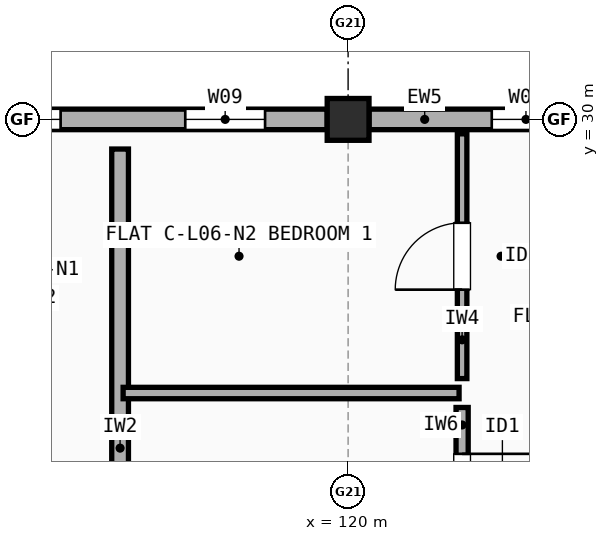
"""IFC4 building model, lengths in metres.
Left out: names, types, materials, properties, quantities, classifications, styles, units other than length and angle.
Written with IfcOpenShell. Run it as: python <this file> out.ifc"""

import sys

from ifc_helpers import new_model, si_unit, direction, frame, frame_2d, origin, origin_2d, place, context, subcontext, project, spatial, rectangle, extrude, element, fill, save


model = new_model("IFC4")
c1 = context("Model", 3, precision=1e-05, world=origin(), true_north=direction((0.0, 1.0)))
c2 = subcontext(c1, "Body", "Model", "MODEL_VIEW")
j1 = project(units=[si_unit("LENGTHUNIT", "METRE"), si_unit("PLANEANGLEUNIT", "RADIAN")], contexts=[c1])
p1 = place(None, origin())
s1 = spatial("IfcSite", under=j1, at=p1, CompositionType="ELEMENT")
p2 = place(p1, origin())
s2 = spatial("IfcBuilding", under=s1, at=p2, CompositionType="ELEMENT")
p3 = place(p2, frame((0.0, 0.0, 20.5)))
s3 = spatial("IfcBuildingStorey", under=s2, at=p3, CompositionType="ELEMENT", Elevation=20.5)
p4 = place(p3, frame((120.0, 30.0, 0.0), z_axis=(0.0, 0.0, 1.0), x_axis=(1.0, 0.0, 0.0)))
e1 = element("IfcColumn", 1, at=p4, inside=s3, PredefinedType="COLUMN", context=c2, shape_type="SweptSolid", body=[
    extrude(rectangle(XDim=0.55, YDim=0.55, at=origin_2d()), origin(), (0.0, 0.0, 1.0), 2.97),
])
p5 = place(p3, frame((125.725, 30.0, 0.0), z_axis=(0.0, 0.0, 1.0), x_axis=(-1.0, 0.0, 0.0)))
e2 = element("IfcWall", 2, at=p5, inside=s3, PredefinedType="STANDARD", context=c2, shape_type="SweptSolid", body=[
    extrude(rectangle(XDim=5.45, YDim=0.27, at=frame_2d((2.725, 0.0))), origin(), (0.0, 0.0, 1.0), 2.452),
])
p6 = place(p5, frame((0.35, 0.0, 0.9)))
e3 = element("IfcOpeningElement", 3, at=p6, cuts=e2, PredefinedType="OPENING", context=c2, shape_type="SweptSolid", body=[
    extrude(rectangle(XDim=0.9, YDim=1.3, at=frame_2d((0.45, 0.65))), frame((0.0, 0.145, 0.0), z_axis=(0.0, -1.0, 0.0), x_axis=(1.0, 0.0, 0.0)), (0.0, 0.0, 1.0), 0.29),
])
p7 = place(p5, frame((2.935, 0.0, 0.9)))
e4 = element("IfcOpeningElement", 4, at=p7, cuts=e2, PredefinedType="OPENING", context=c2, shape_type="SweptSolid", body=[
    extrude(rectangle(XDim=0.9, YDim=1.3, at=frame_2d((0.45, 0.65))), frame((0.0, 0.145, 0.0), z_axis=(0.0, -1.0, 0.0), x_axis=(1.0, 0.0, 0.0)), (0.0, 0.0, 1.0), 0.29),
])
p8 = place(p3, frame((119.725, 30.0, 0.0), z_axis=(0.0, 0.0, 1.0), x_axis=(-1.0, 0.0, 0.0)))
e5 = element("IfcWall", 5, at=p8, inside=s3, PredefinedType="STANDARD", context=c2, shape_type="SweptSolid", body=[
    extrude(rectangle(XDim=5.45, YDim=0.27, at=frame_2d((2.725, 0.0))), origin(), (0.0, 0.0, 1.0), 2.452),
])
p9 = place(p8, frame((0.817, 0.0, 0.9)))
e6 = element("IfcOpeningElement", 6, at=p9, cuts=e5, PredefinedType="OPENING", context=c2, shape_type="SweptSolid", body=[
    extrude(rectangle(XDim=1.05, YDim=1.35, at=frame_2d((0.525, 0.675))), frame((0.0, 0.145, 0.0), z_axis=(0.0, -1.0, 0.0), x_axis=(1.0, 0.0, 0.0)), (0.0, 0.0, 1.0), 0.29),
])
p10 = place(p8, frame((3.508, 0.0, 0.9)))
e7 = element("IfcOpeningElement", 7, at=p10, cuts=e5, PredefinedType="OPENING", context=c2, shape_type="SweptSolid", body=[
    extrude(rectangle(XDim=1.2, YDim=1.35, at=frame_2d((0.6, 0.675))), frame((0.0, 0.145, 0.0), z_axis=(0.0, -1.0, 0.0), x_axis=(1.0, 0.0, 0.0)), (0.0, 0.0, 1.0), 0.29),
])
p11 = place(p3, frame((117.0, 21.74, 0.0), z_axis=(0.0, 0.0, 1.0), x_axis=(0.0, 1.0, 0.0)))
e8 = element("IfcWall", 8, at=p11, inside=s3, PredefinedType="SOLIDWALL", context=c2, shape_type="SweptSolid", body=[
    extrude(rectangle(XDim=7.87, YDim=0.22, at=frame_2d((3.935, 0.0))), origin(), (0.0, 0.0, 1.0), 2.408),
])
p12 = place(p3, frame((121.5, 26.59, 0.0), z_axis=(0.0, 0.0, 1.0), x_axis=(0.0, 1.0, 0.0)))
e9 = element("IfcWall", 9, at=p12, inside=s3, PredefinedType="PARTITIONING", context=c2, shape_type="SweptSolid", body=[
    extrude(rectangle(XDim=3.22, YDim=0.125, at=frame_2d((1.61, 0.0))), origin(), (0.0, 0.0, 1.0), 2.97),
])
p13 = place(p12, frame((1.17, 0.0, 0.0)))
e10 = element("IfcOpeningElement", 10, at=p13, cuts=e9, PredefinedType="OPENING", context=c2, shape_type="SweptSolid", body=[
    extrude(rectangle(XDim=0.88, YDim=2.1, at=frame_2d((0.44, 1.05))), frame((0.0, 0.073, 0.0), z_axis=(0.0, -1.0, 0.0), x_axis=(1.0, 0.0, 0.0)), (0.0, 0.0, 1.0), 0.145),
])
p14 = place(p3, frame((121.5, 24.09, 0.0), z_axis=(0.0, 0.0, 1.0), x_axis=(0.0, 1.0, 0.0)))
e11 = element("IfcWall", 11, at=p14, inside=s3, PredefinedType="PLUMBINGWALL", context=c2, shape_type="SweptSolid", body=[
    extrude(rectangle(XDim=2.12, YDim=0.16, at=frame_2d((1.06, 0.0))), origin(), (0.0, 0.0, 1.0), 2.97),
])
p15 = place(p14, frame((0.61, 0.0, 0.0)))
e12 = element("IfcOpeningElement", 12, at=p15, cuts=e11, PredefinedType="OPENING", context=c2, shape_type="SweptSolid", body=[
    extrude(rectangle(XDim=0.9, YDim=2.1, at=frame_2d((0.45, 1.05))), frame((0.0, 0.09, 0.0), z_axis=(0.0, -1.0, 0.0), x_axis=(1.0, 0.0, 0.0)), (0.0, 0.0, 1.0), 0.18),
])
p16 = place(p3, frame((117.04, 26.4, 0.0), z_axis=(0.0, 0.0, 1.0), x_axis=(1.0, 0.0, 0.0)))
e13 = element("IfcWall", 13, at=p16, inside=s3, PredefinedType="PARTITIONING", context=c2, shape_type="SweptSolid", body=[
    extrude(rectangle(XDim=4.42, YDim=0.15, at=frame_2d((2.21, 0.0))), origin(), (0.0, 0.0, 1.0), 2.458),
])
p17 = place(p7, origin())
e14 = element("IfcWindow", 14, at=p17, inside=s3, PartitioningType="SINGLE_PANEL", PredefinedType="WINDOW", context=c2, shape_type="SweptSolid", body=[
    extrude(rectangle(XDim=0.9, YDim=1.3, at=frame_2d((0.45, 0.65))), frame((0.0, 0.03, 0.0), z_axis=(0.0, -1.0, 0.0), x_axis=(1.0, 0.0, 0.0)), (0.0, 0.0, 1.0), 0.06),
])
fill(e4, e14)
p18 = place(p9, origin())
e15 = element("IfcWindow", 15, at=p18, inside=s3, PartitioningType="SINGLE_PANEL", PredefinedType="WINDOW", context=c2, shape_type="SweptSolid", body=[
    extrude(rectangle(XDim=1.05, YDim=1.35, at=frame_2d((0.525, 0.675))), frame((0.0, 0.03, 0.0), z_axis=(0.0, -1.0, 0.0), x_axis=(1.0, 0.0, 0.0)), (0.0, 0.0, 1.0), 0.06),
])
fill(e6, e15)
p19 = place(p10, origin())
e16 = element("IfcWindow", 16, at=p19, inside=s3, PartitioningType="SINGLE_PANEL", PredefinedType="WINDOW", context=c2, shape_type="SweptSolid", body=[
    extrude(rectangle(XDim=1.2, YDim=1.35, at=frame_2d((0.6, 0.675))), frame((0.0, 0.03, 0.0), z_axis=(0.0, -1.0, 0.0), x_axis=(1.0, 0.0, 0.0)), (0.0, 0.0, 1.0), 0.06),
])
fill(e7, e16)
p20 = place(p13, origin())
e17 = element("IfcDoor", 17, at=p20, inside=s3, OperationType="SINGLE_SWING_LEFT", PredefinedType="DOOR", context=c2, shape_type="SweptSolid", body=[
    extrude(rectangle(XDim=0.88, YDim=2.1, at=frame_2d((0.44, 1.05))), frame((0.0, 0.025, 0.0), z_axis=(0.0, -1.0, 0.0), x_axis=(1.0, 0.0, 0.0)), (0.0, 0.0, 1.0), 0.05),
])
fill(e10, e17)
p21 = place(p15, origin())
e18 = element("IfcDoor", 18, at=p21, inside=s3, OperationType="SINGLE_SWING_RIGHT", PredefinedType="DOOR", context=c2, shape_type="SweptSolid", body=[
    extrude(rectangle(XDim=0.9, YDim=2.1, at=frame_2d((0.45, 1.05))), frame((0.0, 0.025, 0.0), z_axis=(0.0, -1.0, 0.0), x_axis=(1.0, 0.0, 0.0)), (0.0, 0.0, 1.0), 0.05),
])
fill(e12, e18)
save(model, sys.argv[1])
